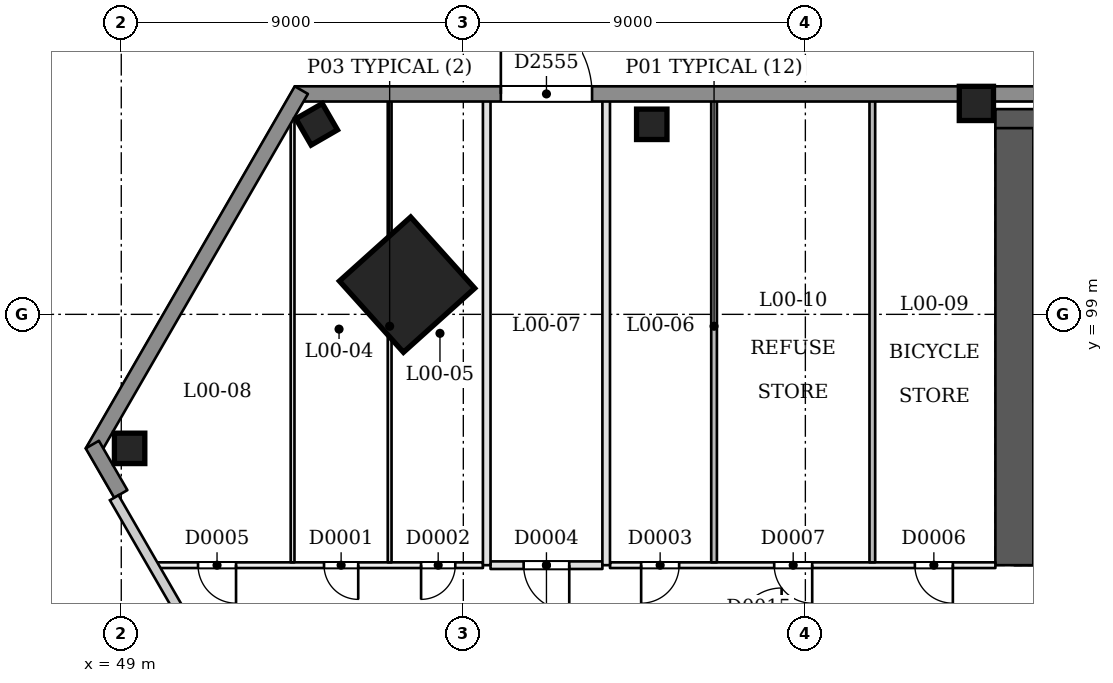
"""IFC4 building model, lengths in metres.
Left out: names, types, materials, properties, quantities, classifications, styles, units other than length and angle.
Written with IfcOpenShell. Run it as: python <this file> out.ifc"""

import sys

from ifc_helpers import new_model, si_unit, direction, frame, frame_2d, origin, origin_2d, place, context, subcontext, project, spatial, rectangle, extrude, element, fill, save


model = new_model("IFC4")
c1 = context("Model", 3, precision=1e-05, world=origin(), true_north=direction((0.0, 1.0)))
c2 = subcontext(c1, "Body", "Model", "MODEL_VIEW")
j1 = project(units=[si_unit("LENGTHUNIT", "METRE"), si_unit("PLANEANGLEUNIT", "RADIAN")], contexts=[c1])
p1 = place(None, origin())
s1 = spatial("IfcSite", under=j1, at=p1, CompositionType="ELEMENT")
p2 = place(p1, origin())
s2 = spatial("IfcBuilding", under=s1, at=p2, CompositionType="ELEMENT")
p3 = place(p2, origin())
s3 = spatial("IfcBuildingStorey", under=s2, at=p3, CompositionType="ELEMENT", Elevation=0.0)
p4 = place(p3, frame((72.5, 92.9, 0.0), z_axis=(0.0, 0.0, 1.0), x_axis=(1.0, 0.0, 0.0)))
e1 = element("IfcWall", 1, at=p4, inside=s3, PredefinedType="SHEAR", context=c2, shape_type="SweptSolid", body=[
    extrude(rectangle(XDim=25.5, YDim=1.0, at=frame_2d((12.75, 0.0))), origin(), (0.0, 0.0, 1.0), 9.0),
])
p5 = place(p4, frame((1.3, 0.0, 0.0)))
e2 = element("IfcOpeningElement", 2, at=p5, cuts=e1, PredefinedType="OPENING", context=c2, shape_type="SweptSolid", body=[
    extrude(rectangle(XDim=1.2, YDim=2.1, at=frame_2d((0.6, 1.05))), frame((0.0, 0.51, 0.0), z_axis=(0.0, -1.0, 0.0), x_axis=(1.0, 0.0, 0.0)), (0.0, 0.0, 1.0), 1.021),
])
p6 = place(p4, frame((3.5, 0.0, 0.0)))
e3 = element("IfcOpeningElement", 3, at=p6, cuts=e1, PredefinedType="OPENING", context=c2, shape_type="SweptSolid", body=[
    extrude(rectangle(XDim=1.2, YDim=2.1, at=frame_2d((0.6, 1.05))), frame((0.0, 0.51, 0.0), z_axis=(0.0, -1.0, 0.0), x_axis=(1.0, 0.0, 0.0)), (0.0, 0.0, 1.0), 1.021),
])
p7 = place(p4, frame((18.4, 0.0, 0.0)))
e4 = element("IfcOpeningElement", 4, at=p7, cuts=e1, PredefinedType="OPENING", context=c2, shape_type="SweptSolid", body=[
    extrude(rectangle(XDim=1.0, YDim=2.1, at=frame_2d((0.5, 1.05))), frame((0.0, 0.51, 0.0), z_axis=(0.0, -1.0, 0.0), x_axis=(1.0, 0.0, 0.0)), (0.0, 0.0, 1.0), 1.021),
])
p8 = place(p3, frame((97.5, 103.9, 0.0), z_axis=(0.0, 0.0, 1.0), x_axis=(-1.0, 0.0, 0.0)))
e5 = element("IfcWall", 5, at=p8, inside=s3, PredefinedType="SHEAR", context=c2, shape_type="SweptSolid", body=[
    extrude(rectangle(XDim=25.5, YDim=1.0, at=frame_2d((12.75, 0.0))), origin(), (0.0, 0.0, 1.0), 9.0),
])
p9 = place(p8, frame((19.7, 0.0, 0.0)))
e6 = element("IfcOpeningElement", 6, at=p9, cuts=e5, PredefinedType="OPENING", context=c2, shape_type="SweptSolid", body=[
    extrude(rectangle(XDim=1.5, YDim=2.1, at=frame_2d((0.75, 1.05))), frame((0.0, 0.51, 0.0), z_axis=(0.0, -1.0, 0.0), x_axis=(1.0, 0.0, 0.0)), (0.0, 0.0, 1.0), 1.021),
])
p10 = place(p8, frame((4.05, 0.0, 0.0)))
e7 = element("IfcOpeningElement", 7, at=p10, cuts=e5, PredefinedType="OPENING", context=c2, shape_type="SweptSolid", body=[
    extrude(rectangle(XDim=1.5, YDim=2.1, at=frame_2d((0.75, 1.05))), frame((0.0, 0.51, 0.0), z_axis=(0.0, -1.0, 0.0), x_axis=(1.0, 0.0, 0.0)), (0.0, 0.0, 1.0), 1.021),
])
p11 = place(p3, frame((72.5, 103.9, 0.0), z_axis=(0.0, 0.0, 1.0), x_axis=(0.0, -1.0, 0.0)))
e8 = element("IfcWall", 8, at=p11, inside=s3, PredefinedType="SHEAR", context=c2, shape_type="SweptSolid", body=[
    extrude(rectangle(XDim=11.5, YDim=1.0, at=frame_2d((5.75, 0.0))), origin(), (0.0, 0.0, 1.0), 9.0),
])
p12 = place(p3, frame((56.486, 99.77, 0.0), z_axis=(0.028389030864, 0.009246093147, 0.999554186969), x_axis=(-0.865623766026, 0.500297112661, 0.01995732334)))
e9 = element("IfcColumn", 9, at=p12, inside=s3, PredefinedType="COLUMN", context=c2, shape_type="SweptSolid", body=[
    extrude(rectangle(XDim=2.52, YDim=2.52, at=origin_2d()), origin(), (0.0, 0.0, 1.0), 9.004),
])
p13 = place(p3, frame((71.5, 104.55, 0.0), z_axis=(0.0, 0.0, 1.0), x_axis=(1.0, 0.0, 0.0)))
e10 = element("IfcColumn", 10, at=p13, inside=s3, PredefinedType="COLUMN", context=c2, shape_type="SweptSolid", body=[
    extrude(rectangle(XDim=0.9, YDim=0.9, at=origin_2d()), origin(), (0.0, 0.0, 1.0), 9.0),
])
for number, where, z_axis, x_axis in (
    (11, (62.959, 104.0, 0.0), (0.0, 0.0, 1.0), (1.0, 0.0, 0.0)),
    (12, (54.142, 104.0, 0.0), (0.0, 0.0, 1.0), (0.866, 0.5, 0.0)),
    (13, (49.219, 95.474, 0.0), (0.0, 0.0, 1.0), (1.0, 1.745e-08, 0.0)),
):
    element("IfcColumn", number, at=place(p3, frame(where, z_axis=z_axis, x_axis=x_axis)), inside=s3, PredefinedType="COLUMN", context=c2, shape_type="SweptSolid", body=[
        extrude(rectangle(XDim=0.8, YDim=0.8, at=origin_2d()), origin(), (0.0, 0.0, 1.0), 9.0),
    ])
p14 = place(p3, frame((61.659, 92.4, 0.0), z_axis=(0.0, 0.0, 1.0), x_axis=(-1.0, 0.0, 0.0)))
e14 = element("IfcWall", 14, at=p14, inside=s3, PredefinedType="PARTITIONING", context=c2, shape_type="SweptSolid", body=[
    extrude(rectangle(XDim=2.944, YDim=0.2, at=frame_2d((1.472, 0.0))), origin(), (0.0, 0.0, 1.0), 8.55),
])
p15 = place(p14, frame((0.872, 0.0, 0.0)))
e15 = element("IfcOpeningElement", 15, at=p15, cuts=e14, PredefinedType="OPENING", context=c2, shape_type="SweptSolid", body=[
    extrude(rectangle(XDim=1.2, YDim=2.4, at=frame_2d((0.6, 1.2))), frame((0.0, 0.11, 0.0), z_axis=(0.0, -1.0, 0.0), x_axis=(1.0, 0.0, 0.0)), (0.0, 0.0, 1.0), 0.221),
])
p16 = place(p3, frame((58.516, 92.4, 0.0), z_axis=(0.0, 0.0, 1.0), x_axis=(-1.0, 0.0, 0.0)))
e16 = element("IfcWall", 16, at=p16, inside=s3, PredefinedType="PARTITIONING", context=c2, shape_type="SweptSolid", body=[
    extrude(rectangle(XDim=8.6, YDim=0.15, at=frame_2d((4.3, 0.0))), origin(), (0.0, 0.0, 1.0), 8.55),
])
p17 = place(p16, frame((3.281, 0.0, 0.0)))
e17 = element("IfcOpeningElement", 17, at=p17, cuts=e16, PredefinedType="OPENING", context=c2, shape_type="SweptSolid", body=[
    extrude(rectangle(XDim=0.9, YDim=2.1, at=frame_2d((0.45, 1.05))), frame((0.0, 0.085, 0.0), z_axis=(0.0, -1.0, 0.0), x_axis=(1.0, 0.0, 0.0)), (0.0, 0.0, 1.0), 0.171),
])
p18 = place(p16, frame((0.727, 0.0, 0.0)))
e18 = element("IfcOpeningElement", 18, at=p18, cuts=e16, PredefinedType="OPENING", context=c2, shape_type="SweptSolid", body=[
    extrude(rectangle(XDim=0.9, YDim=2.1, at=frame_2d((0.45, 1.05))), frame((0.0, 0.085, 0.0), z_axis=(0.0, -1.0, 0.0), x_axis=(1.0, 0.0, 0.0)), (0.0, 0.0, 1.0), 0.171),
])
p19 = place(p16, frame((6.496, 0.0, 0.0)))
e19 = element("IfcOpeningElement", 19, at=p19, cuts=e16, PredefinedType="OPENING", context=c2, shape_type="SweptSolid", body=[
    extrude(rectangle(XDim=1.0, YDim=2.1, at=frame_2d((0.5, 1.05))), frame((0.0, 0.085, 0.0), z_axis=(0.0, -1.0, 0.0), x_axis=(1.0, 0.0, 0.0)), (0.0, 0.0, 1.0), 0.171),
])
p20 = place(p3, frame((72.0, 92.4, 0.0), z_axis=(0.0, 0.0, 1.0), x_axis=(-1.0, 0.0, 0.0)))
e20 = element("IfcWall", 20, at=p20, inside=s3, PredefinedType="PARTITIONING", context=c2, shape_type="SweptSolid", body=[
    extrude(rectangle(XDim=10.141, YDim=0.15, at=frame_2d((5.07, 0.0))), origin(), (0.0, 0.0, 1.0), 8.55),
])
p21 = place(p20, frame((8.321, 0.0, 0.0)))
e21 = element("IfcOpeningElement", 21, at=p21, cuts=e20, PredefinedType="OPENING", context=c2, shape_type="SweptSolid", body=[
    extrude(rectangle(XDim=1.0, YDim=2.1, at=frame_2d((0.5, 1.05))), frame((0.0, 0.085, 0.0), z_axis=(0.0, -1.0, 0.0), x_axis=(1.0, 0.0, 0.0)), (0.0, 0.0, 1.0), 0.171),
])
p22 = place(p20, frame((1.119, 0.0, 0.0)))
e22 = element("IfcOpeningElement", 22, at=p22, cuts=e20, PredefinedType="OPENING", context=c2, shape_type="SweptSolid", body=[
    extrude(rectangle(XDim=1.0, YDim=2.1, at=frame_2d((0.5, 1.05))), frame((0.0, 0.085, 0.0), z_axis=(0.0, -1.0, 0.0), x_axis=(1.0, 0.0, 0.0)), (0.0, 0.0, 1.0), 0.171),
])
p23 = place(p20, frame((4.82, 0.0, 0.0)))
e23 = element("IfcOpeningElement", 23, at=p23, cuts=e20, PredefinedType="OPENING", context=c2, shape_type="SweptSolid", body=[
    extrude(rectangle(XDim=1.0, YDim=2.1, at=frame_2d((0.5, 1.05))), frame((0.0, 0.085, 0.0), z_axis=(0.0, -1.0, 0.0), x_axis=(1.0, 0.0, 0.0)), (0.0, 0.0, 1.0), 0.171),
])
p24 = place(p3, frame((56.062, 92.475, 0.0), z_axis=(0.0, 0.0, 1.0), x_axis=(0.0, 1.0, 0.0)))
e24 = element("IfcWall", 24, at=p24, inside=s3, PredefinedType="PARTITIONING", context=c2, shape_type="SweptSolid", body=[
    extrude(rectangle(XDim=12.425, YDim=0.1, at=frame_2d((6.212, 0.0))), origin(), (0.0, 0.0, 1.0), 8.55),
])
p25 = place(p3, frame((53.508, 104.701, 0.0), z_axis=(0.0, 0.0, 1.0), x_axis=(0.0, -1.0, 0.0)))
e25 = element("IfcWall", 25, at=p25, inside=s3, PredefinedType="PARTITIONING", context=c2, shape_type="SweptSolid", body=[
    extrude(rectangle(XDim=12.226, YDim=0.1, at=frame_2d((6.113, 0.0))), origin(), (0.0, 0.0, 1.0), 8.55),
])
for number, where, z_axis, x_axis in (
    (26, (58.616, 92.4, 0.0), (0.0, 0.0, 1.0), (0.0, 1.0, 0.0)),
    (27, (61.759, 104.9, 0.0), (0.0, 0.0, 1.0), (0.0, -1.0, 0.0)),
):
    element("IfcWall", number, at=place(p3, frame(where, z_axis=z_axis, x_axis=x_axis)), inside=s3, PredefinedType="PARTITIONING", context=c2, shape_type="SweptSolid", body=[
        extrude(rectangle(XDim=12.5, YDim=0.2, at=frame_2d((6.25, 0.0))), origin(), (0.0, 0.0, 1.0), 8.55),
    ])
for number, where, z_axis, x_axis in (
    (28, (64.598, 92.475, 0.0), (0.0, 0.0, 1.0), (0.0, 1.0, 0.0)),
    (29, (68.762, 104.9, 0.0), (0.0, 0.0, 1.0), (0.0, -1.0, 0.0)),
):
    element("IfcWall", number, at=place(p3, frame(where, z_axis=z_axis, x_axis=x_axis)), inside=s3, PredefinedType="PARTITIONING", context=c2, shape_type="SweptSolid", body=[
        extrude(rectangle(XDim=12.425, YDim=0.15, at=frame_2d((6.212, 0.0))), origin(), (0.0, 0.0, 1.0), 8.55),
    ])
p26 = place(p3, frame((53.565, 104.8, 0.0), z_axis=(0.0, 0.0, 1.0), x_axis=(1.0, 0.0, 0.0)))
e30 = element("IfcWall", 30, at=p26, inside=s3, PredefinedType="SOLIDWALL", context=c2, shape_type="SweptSolid", body=[
    extrude(rectangle(XDim=62.871, YDim=0.4, at=frame_2d((31.435, 0.0))), origin(), (0.0, 0.0, 1.0), 8.55),
])
p27 = place(p26, frame((51.495, 0.0, 0.0)))
e31 = element("IfcOpeningElement", 31, at=p27, cuts=e30, PredefinedType="OPENING", context=c2, shape_type="SweptSolid", body=[
    extrude(rectangle(XDim=1.2, YDim=2.4, at=frame_2d((0.6, 1.2))), frame((0.0, 0.21, 0.0), z_axis=(0.0, -1.0, 0.0), x_axis=(1.0, 0.0, 0.0)), (0.0, 0.0, 1.0), 0.421),
])
p28 = place(p26, frame((38.385, 0.0, 0.0)))
e32 = element("IfcOpeningElement", 32, at=p28, cuts=e30, PredefinedType="OPENING", context=c2, shape_type="SweptSolid", body=[
    extrude(rectangle(XDim=1.5, YDim=2.4, at=frame_2d((0.75, 1.2))), frame((0.0, 0.21, 0.0), z_axis=(0.0, -1.0, 0.0), x_axis=(1.0, 0.0, 0.0)), (0.0, 0.0, 1.0), 0.421),
])
p29 = place(p26, frame((22.735, 0.0, 0.0)))
e33 = element("IfcOpeningElement", 33, at=p29, cuts=e30, PredefinedType="OPENING", context=c2, shape_type="SweptSolid", body=[
    extrude(rectangle(XDim=1.5, YDim=2.4, at=frame_2d((0.75, 1.2))), frame((0.0, 0.21, 0.0), z_axis=(0.0, -1.0, 0.0), x_axis=(1.0, 0.0, 0.0)), (0.0, 0.0, 1.0), 0.421),
])
p30 = place(p26, frame((5.423, 0.0, 0.0)))
e34 = element("IfcOpeningElement", 34, at=p30, cuts=e30, PredefinedType="OPENING", context=c2, shape_type="SweptSolid", body=[
    extrude(rectangle(XDim=2.4, YDim=3.0, at=frame_2d((1.2, 1.5))), frame((0.0, 0.21, 0.0), z_axis=(0.0, -1.0, 0.0), x_axis=(1.0, 0.0, 0.0)), (0.0, 0.0, 1.0), 0.421),
])
p31 = place(p3, frame((48.238, 95.374, 0.0), z_axis=(0.0, 0.0, 1.0), x_axis=(0.50000615651, 0.866021849293, 0.0)))
e35 = element("IfcWall", 35, at=p31, inside=s3, PredefinedType="SOLIDWALL", context=c2, shape_type="SweptSolid", body=[
    extrude(rectangle(XDim=11.0, YDim=0.4, at=frame_2d((5.5, 0.0))), origin(), (0.0, 0.0, 1.0), 8.55),
])
p32 = place(p3, frame((48.988, 94.275, 0.0), z_axis=(0.0, 0.0, 1.0), x_axis=(-0.499990139034, 0.866031096941, 0.0)))
e36 = element("IfcWall", 36, at=p32, inside=s3, PredefinedType="SOLIDWALL", context=c2, shape_type="SweptSolid", body=[
    extrude(rectangle(XDim=1.5, YDim=0.4, at=frame_2d((0.75, 0.0))), origin(), (0.0, 0.0, 1.0), 8.55),
])
p33 = place(p17, origin())
e37 = element("IfcDoor", 37, at=p33, inside=s3, OperationType="SINGLE_SWING_LEFT", PredefinedType="NOTDEFINED", context=c2, shape_type="SweptSolid", body=[
    extrude(rectangle(XDim=0.9, YDim=2.1, at=frame_2d((0.45, 1.05))), frame((0.0, 0.025, 0.0), z_axis=(0.0, -1.0, 0.0), x_axis=(1.0, 0.0, 0.0)), (0.0, 0.0, 1.0), 0.05),
])
fill(e17, e37)
p34 = place(p18, origin())
e38 = element("IfcDoor", 38, at=p34, inside=s3, OperationType="SINGLE_SWING_RIGHT", PredefinedType="NOTDEFINED", context=c2, shape_type="SweptSolid", body=[
    extrude(rectangle(XDim=0.9, YDim=2.1, at=frame_2d((0.45, 1.05))), frame((0.0, 0.025, 0.0), z_axis=(0.0, -1.0, 0.0), x_axis=(1.0, 0.0, 0.0)), (0.0, 0.0, 1.0), 0.05),
])
fill(e18, e38)
p35 = place(p21, origin())
e39 = element("IfcDoor", 39, at=p35, inside=s3, OperationType="SINGLE_SWING_RIGHT", PredefinedType="NOTDEFINED", context=c2, shape_type="SweptSolid", body=[
    extrude(rectangle(XDim=1.0, YDim=2.1, at=frame_2d((0.5, 1.05))), frame((0.0, 0.025, 0.0), z_axis=(0.0, -1.0, 0.0), x_axis=(1.0, 0.0, 0.0)), (0.0, 0.0, 1.0), 0.05),
])
fill(e21, e39)
p36 = place(p15, origin())
e40 = element("IfcDoor", 40, at=p36, inside=s3, OperationType="SINGLE_SWING_LEFT", PredefinedType="NOTDEFINED", context=c2, shape_type="SweptSolid", body=[
    extrude(rectangle(XDim=1.2, YDim=2.4, at=frame_2d((0.6, 1.2))), frame((0.0, 0.025, 0.0), z_axis=(0.0, -1.0, 0.0), x_axis=(1.0, 0.0, 0.0)), (0.0, 0.0, 1.0), 0.05),
])
fill(e15, e40)
p37 = place(p19, origin())
e41 = element("IfcDoor", 41, at=p37, inside=s3, OperationType="SINGLE_SWING_LEFT", PredefinedType="NOTDEFINED", context=c2, shape_type="SweptSolid", body=[
    extrude(rectangle(XDim=1.0, YDim=2.1, at=frame_2d((0.5, 1.05))), frame((0.0, 0.025, 0.0), z_axis=(0.0, -1.0, 0.0), x_axis=(1.0, 0.0, 0.0)), (0.0, 0.0, 1.0), 0.05),
])
fill(e19, e41)
p38 = place(p22, origin())
e42 = element("IfcDoor", 42, at=p38, inside=s3, OperationType="SINGLE_SWING_LEFT", PredefinedType="NOTDEFINED", context=c2, shape_type="SweptSolid", body=[
    extrude(rectangle(XDim=1.0, YDim=2.1, at=frame_2d((0.5, 1.05))), frame((0.0, 0.025, 0.0), z_axis=(0.0, -1.0, 0.0), x_axis=(1.0, 0.0, 0.0)), (0.0, 0.0, 1.0), 0.05),
])
fill(e22, e42)
p39 = place(p23, origin())
e43 = element("IfcDoor", 43, at=p39, inside=s3, OperationType="SINGLE_SWING_LEFT", PredefinedType="NOTDEFINED", context=c2, shape_type="SweptSolid", body=[
    extrude(rectangle(XDim=1.0, YDim=2.1, at=frame_2d((0.5, 1.05))), frame((0.0, 0.025, 0.0), z_axis=(0.0, -1.0, 0.0), x_axis=(1.0, 0.0, 0.0)), (0.0, 0.0, 1.0), 0.05),
])
fill(e23, e43)
p40 = place(p30, origin())
e44 = element("IfcDoor", 44, at=p40, inside=s3, OperationType="NOTDEFINED", PredefinedType="NOTDEFINED", context=c2, shape_type="SweptSolid", body=[
    extrude(rectangle(XDim=2.4, YDim=3.0, at=frame_2d((1.2, 1.5))), frame((0.0, 0.025, 0.0), z_axis=(0.0, -1.0, 0.0), x_axis=(1.0, 0.0, 0.0)), (0.0, 0.0, 1.0), 0.05),
])
fill(e34, e44)
save(model, sys.argv[1])
